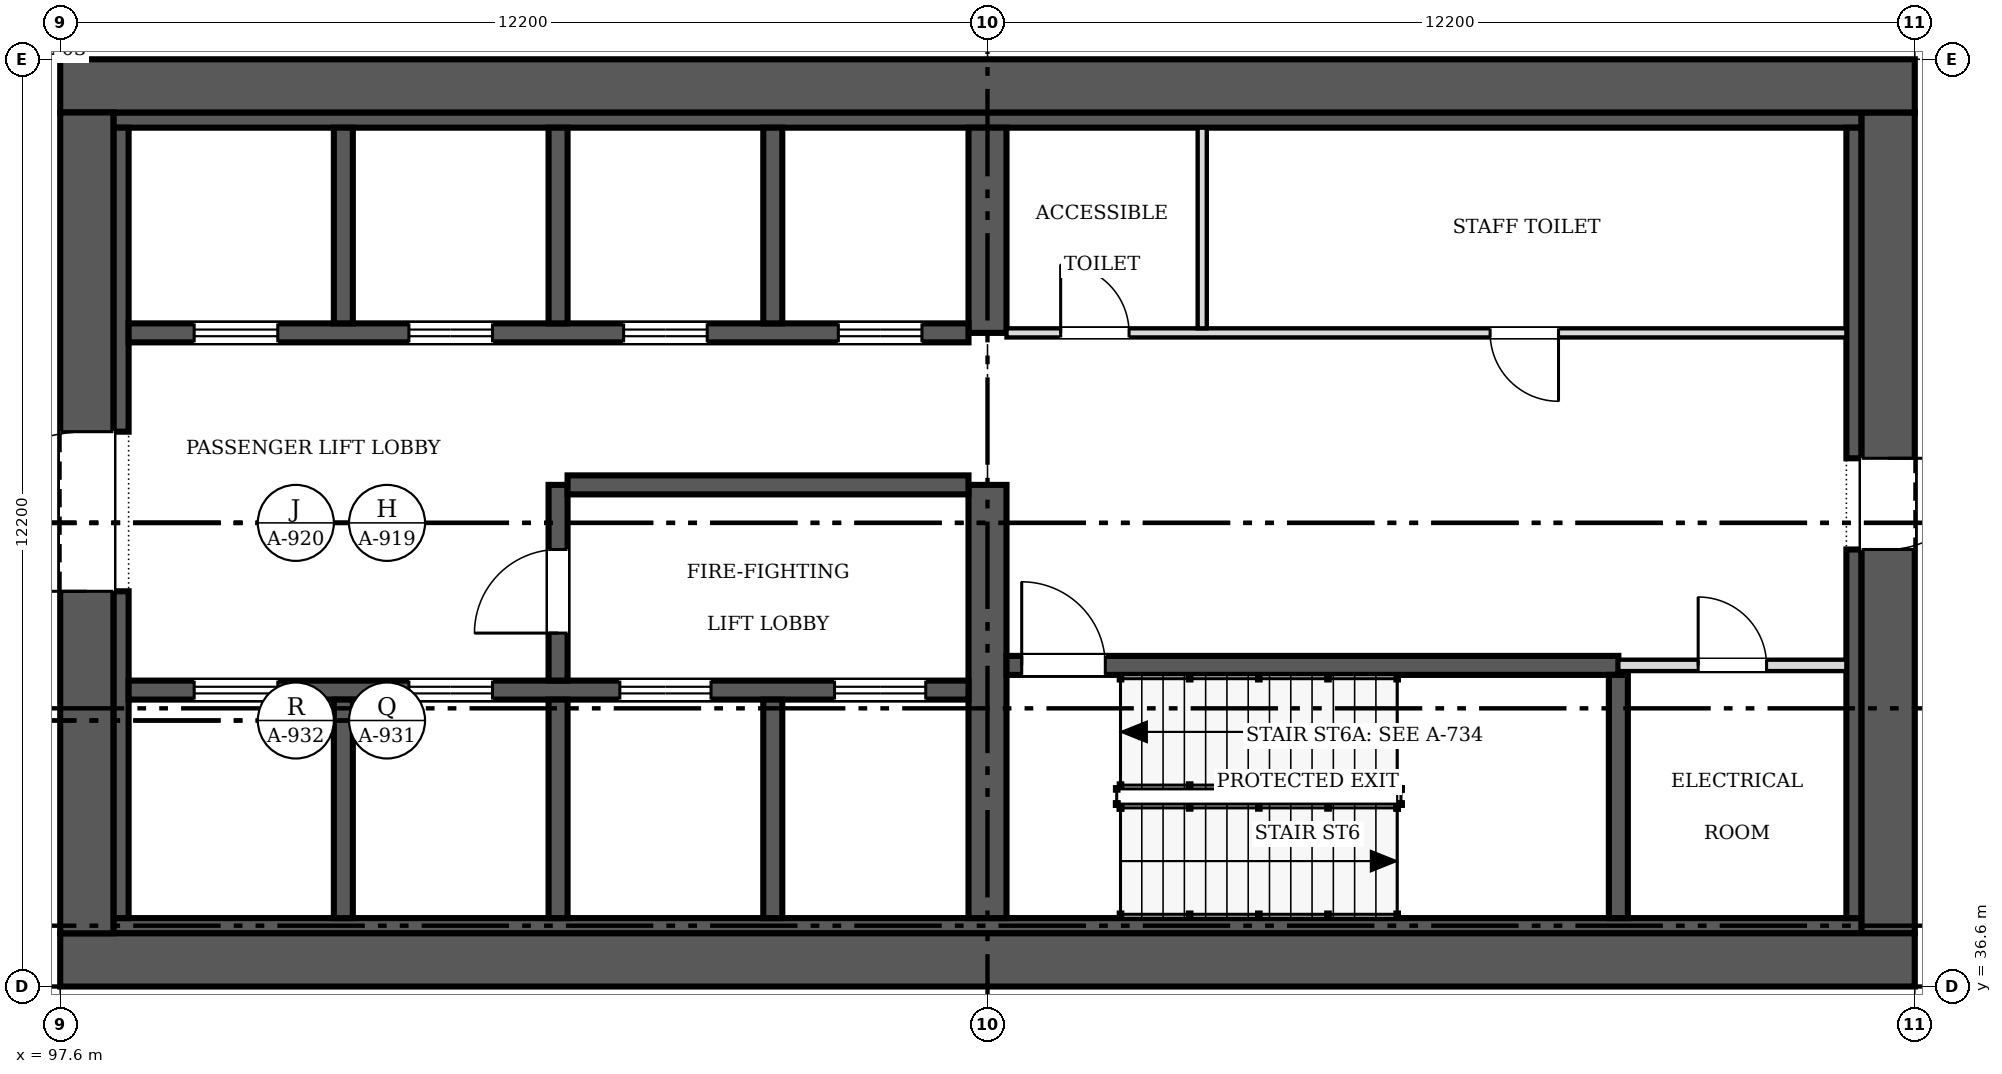
"""IFC4 building model, lengths in metres.
Left out: names, types, materials, properties, quantities, classifications, styles, units other than length and angle.
Written with IfcOpenShell. Run it as: python <this file> out.ifc"""

import sys

from ifc_helpers import new_model, si_unit, direction, frame, frame_2d, origin, place, context, subcontext, project, spatial, rectangle, extrude, source, transform, mapped, element, fill, save


model = new_model("IFC4")
c1 = context("Model", 3, precision=1e-05, world=origin(), true_north=direction((0.0, 1.0)))
c2 = subcontext(c1, "Body", "Model", "MODEL_VIEW")
j1 = project(units=[si_unit("LENGTHUNIT", "METRE"), si_unit("PLANEANGLEUNIT", "RADIAN")], contexts=[c1])
p1 = place(None, origin())
s1 = spatial("IfcSite", under=j1, at=p1, CompositionType="ELEMENT")
p2 = place(p1, origin())
s2 = spatial("IfcBuilding", under=s1, at=p2, CompositionType="ELEMENT")
p3 = place(p2, frame((0.0, 0.0, 7.2)))
s3 = spatial("IfcBuildingStorey", under=s2, at=p3, CompositionType="ELEMENT", Elevation=7.2)
p4 = place(p3, frame((122.0, 36.95, 0.0), z_axis=(0.0, 0.0, 1.0), x_axis=(-1.0, 0.0, 0.0)))
e1 = element("IfcWall", 1, at=p4, inside=s3, PredefinedType="SHEAR", context=c2, shape_type="SweptSolid", body=[
    extrude(rectangle(XDim=24.4, YDim=0.7, at=frame_2d((12.2, 0.0))), origin(), (0.0, 0.0, 1.0), 4.8),
])
p5 = place(p3, frame((97.95, 37.3, 0.0), z_axis=(0.0, 0.0, 1.0), x_axis=(0.0, 1.0, 0.0)))
e2 = element("IfcWall", 2, at=p5, inside=s3, PredefinedType="SHEAR", context=c2, shape_type="SweptSolid", body=[
    extrude(rectangle(XDim=10.8, YDim=0.7, at=frame_2d((5.4, 0.0))), origin(), (0.0, 0.0, 1.0), 4.8),
])
m1 = source(origin(), c2, "Body", "SweptSolid", [
    extrude(rectangle(XDim=2.1, YDim=2.4, at=frame_2d((1.05, 1.2))), frame((0.0, 0.36, 0.0), z_axis=(0.0, -1.0, 0.0), x_axis=(1.0, 0.0, 0.0)), (0.0, 0.0, 1.0), 0.72),
])
p6 = place(p5, frame((4.5, 0.0, 0.0)))
e3 = element("IfcOpeningElement", 3, at=p6, cuts=e2, PredefinedType="OPENING", context=c2, shape_type="MappedRepresentation", body=[
    mapped(m1, transform((0.0, 0.0, 0.0), scale=1.0)),
])
p7 = place(p3, frame((97.6, 48.45, 0.0), z_axis=(0.0, 0.0, 1.0), x_axis=(1.0, 0.0, 0.0)))
e4 = element("IfcWall", 4, at=p7, inside=s3, PredefinedType="SHEAR", context=c2, shape_type="SweptSolid", body=[
    extrude(rectangle(XDim=24.4, YDim=0.7, at=frame_2d((12.2, 0.0))), origin(), (0.0, 0.0, 1.0), 4.8),
])
p8 = place(p3, frame((121.65, 48.1, 0.0), z_axis=(0.0, 0.0, 1.0), x_axis=(0.0, -1.0, 0.0)))
e5 = element("IfcWall", 5, at=p8, inside=s3, PredefinedType="SHEAR", context=c2, shape_type="SweptSolid", body=[
    extrude(rectangle(XDim=10.8, YDim=0.7, at=frame_2d((5.4, 0.0))), origin(), (0.0, 0.0, 1.0), 4.8),
])
m2 = source(origin(), c2, "Body", "SweptSolid", [
    extrude(rectangle(XDim=1.2, YDim=2.1, at=frame_2d((0.6, 1.05))), frame((0.0, 0.36, 0.0), z_axis=(0.0, -1.0, 0.0), x_axis=(1.0, 0.0, 0.0)), (0.0, 0.0, 1.0), 0.72),
])
p9 = place(p8, frame((4.55, 0.0, 0.0)))
e6 = element("IfcOpeningElement", 6, at=p9, cuts=e5, PredefinedType="OPENING", context=c2, shape_type="MappedRepresentation", body=[
    mapped(m2, transform((0.0, 0.0, 0.0), scale=1.0)),
])
for number, where, z_axis, x_axis in (
    (7, (98.3, 37.4, 0.0), (0.0, 0.0, 1.0), (1.0, 0.0, 0.0)),
    (8, (98.3, 48.0, 0.0), (0.0, 0.0, 1.0), (1.0, 0.0, 0.0)),
):
    element("IfcWall", number, at=place(p3, frame(where, z_axis=z_axis, x_axis=x_axis)), inside=s3, PredefinedType="SOLIDWALL", context=c2, shape_type="SweptSolid", body=[
        extrude(rectangle(XDim=23.0, YDim=0.2, at=frame_2d((11.5, 0.0))), origin(), (0.0, 0.0, 1.0), 4.8),
    ])
p10 = place(p3, frame((98.4, 37.5, 0.0), z_axis=(0.0, 0.0, 1.0), x_axis=(0.0, 1.0, 0.0)))
e9 = element("IfcWall", 9, at=p10, inside=s3, PredefinedType="SOLIDWALL", context=c2, shape_type="SweptSolid", body=[
    extrude(rectangle(XDim=4.3, YDim=0.2, at=frame_2d((2.15, 0.0))), origin(), (0.0, 0.0, 1.0), 4.8),
])
p11 = place(p3, frame((98.4, 43.9, 0.0), z_axis=(0.0, 0.0, 1.0), x_axis=(0.0, 1.0, 0.0)))
e10 = element("IfcWall", 10, at=p11, inside=s3, PredefinedType="SOLIDWALL", context=c2, shape_type="SweptSolid", body=[
    extrude(rectangle(XDim=4.0, YDim=0.2, at=frame_2d((2.0, 0.0))), origin(), (0.0, 0.0, 1.0), 4.8),
])
p12 = place(p3, frame((121.2, 37.5, 0.0), z_axis=(0.0, 0.0, 1.0), x_axis=(0.0, 1.0, 0.0)))
e11 = element("IfcWall", 11, at=p12, inside=s3, PredefinedType="SOLIDWALL", context=c2, shape_type="SweptSolid", body=[
    extrude(rectangle(XDim=4.85, YDim=0.2, at=frame_2d((2.425, 0.0))), origin(), (0.0, 0.0, 1.0), 4.8),
])
p13 = place(p3, frame((121.2, 43.55, 0.0), z_axis=(0.0, 0.0, 1.0), x_axis=(0.0, 1.0, 0.0)))
e12 = element("IfcWall", 12, at=p13, inside=s3, PredefinedType="SOLIDWALL", context=c2, shape_type="SweptSolid", body=[
    extrude(rectangle(XDim=4.35, YDim=0.2, at=frame_2d((2.175, 0.0))), origin(), (0.0, 0.0, 1.0), 4.8),
])
p14 = place(p3, frame((109.8, 37.5, 0.0), z_axis=(0.0, 0.0, 1.0), x_axis=(0.0, 1.0, 0.0)))
e13 = element("IfcWall", 13, at=p14, inside=s3, PredefinedType="SHEAR", context=c2, shape_type="SweptSolid", body=[
    extrude(rectangle(XDim=5.7, YDim=0.5, at=frame_2d((2.85, 0.0))), origin(), (0.0, 0.0, 1.0), 4.8),
])
p15 = place(p3, frame((109.8, 45.2, 0.0), z_axis=(0.0, 0.0, 1.0), x_axis=(0.0, 1.0, 0.0)))
e14 = element("IfcWall", 14, at=p15, inside=s3, PredefinedType="SHEAR", context=c2, shape_type="SweptSolid", body=[
    extrude(rectangle(XDim=2.7, YDim=0.5, at=frame_2d((1.35, 0.0))), origin(), (0.0, 0.0, 1.0), 4.8),
])
p16 = place(p3, frame((98.5, 40.5, 0.0), z_axis=(0.0, 0.0, 1.0), x_axis=(1.0, 0.0, 0.0)))
e15 = element("IfcWall", 15, at=p16, inside=s3, PredefinedType="SOLIDWALL", context=c2, shape_type="SweptSolid", body=[
    extrude(rectangle(XDim=11.05, YDim=0.25, at=frame_2d((5.525, 0.0))), origin(), (0.0, 0.0, 1.0), 4.8),
])
m3 = source(origin(), c2, "Body", "SweptSolid", [
    extrude(rectangle(XDim=1.1, YDim=2.1, at=frame_2d((0.55, 1.05))), frame((0.0, 0.135, 0.0), z_axis=(0.0, -1.0, 0.0), x_axis=(1.0, 0.0, 0.0)), (0.0, 0.0, 1.0), 0.27),
])
p17 = place(p16, frame((0.863, 0.0, 0.0)))
e16 = element("IfcOpeningElement", 16, at=p17, cuts=e15, PredefinedType="OPENING", context=c2, shape_type="MappedRepresentation", body=[
    mapped(m3, transform((0.0, 0.0, 0.0), scale=1.0)),
])
p18 = place(p16, frame((3.688, 0.0, 0.0)))
e17 = element("IfcOpeningElement", 17, at=p18, cuts=e15, PredefinedType="OPENING", context=c2, shape_type="MappedRepresentation", body=[
    mapped(m3, transform((0.0, 0.0, 0.0), scale=1.0)),
])
m4 = source(origin(), c2, "Body", "SweptSolid", [
    extrude(rectangle(XDim=1.2, YDim=2.1, at=frame_2d((0.6, 1.05))), frame((0.0, 0.135, 0.0), z_axis=(0.0, -1.0, 0.0), x_axis=(1.0, 0.0, 0.0)), (0.0, 0.0, 1.0), 0.27),
])
p19 = place(p16, frame((6.462, 0.0, 0.0)))
e18 = element("IfcOpeningElement", 18, at=p19, cuts=e15, PredefinedType="OPENING", context=c2, shape_type="MappedRepresentation", body=[
    mapped(m4, transform((0.0, 0.0, 0.0), scale=1.0)),
])
p20 = place(p16, frame((9.288, 0.0, 0.0)))
e19 = element("IfcOpeningElement", 19, at=p20, cuts=e15, PredefinedType="OPENING", context=c2, shape_type="MappedRepresentation", body=[
    mapped(m4, transform((0.0, 0.0, 0.0), scale=1.0)),
])
p21 = place(p3, frame((109.55, 45.2, 0.0), z_axis=(0.0, 0.0, 1.0), x_axis=(-1.0, 0.0, 0.0)))
e20 = element("IfcWall", 20, at=p21, inside=s3, PredefinedType="SOLIDWALL", context=c2, shape_type="SweptSolid", body=[
    extrude(rectangle(XDim=11.05, YDim=0.25, at=frame_2d((5.525, 0.0))), origin(), (0.0, 0.0, 1.0), 4.8),
])
p22 = place(p21, frame((9.087, 0.0, 0.0)))
e21 = element("IfcOpeningElement", 21, at=p22, cuts=e20, PredefinedType="OPENING", context=c2, shape_type="MappedRepresentation", body=[
    mapped(m3, transform((0.0, 0.0, 0.0), scale=1.0)),
])
p23 = place(p21, frame((6.262, 0.0, 0.0)))
e22 = element("IfcOpeningElement", 22, at=p23, cuts=e20, PredefinedType="OPENING", context=c2, shape_type="MappedRepresentation", body=[
    mapped(m3, transform((0.0, 0.0, 0.0), scale=1.0)),
])
p24 = place(p21, frame((3.438, 0.0, 0.0)))
e23 = element("IfcOpeningElement", 23, at=p24, cuts=e20, PredefinedType="OPENING", context=c2, shape_type="MappedRepresentation", body=[
    mapped(m3, transform((0.0, 0.0, 0.0), scale=1.0)),
])
p25 = place(p21, frame((0.613, 0.0, 0.0)))
e24 = element("IfcOpeningElement", 24, at=p25, cuts=e20, PredefinedType="OPENING", context=c2, shape_type="MappedRepresentation", body=[
    mapped(m3, transform((0.0, 0.0, 0.0), scale=1.0)),
])
p26 = place(p3, frame((118.1, 40.825, 0.0), z_axis=(0.0, 0.0, 1.0), x_axis=(-1.0, 0.0, 0.0)))
e25 = element("IfcWall", 25, at=p26, inside=s3, PredefinedType="SOLIDWALL", context=c2, shape_type="SweptSolid", body=[
    extrude(rectangle(XDim=8.05, YDim=0.25, at=frame_2d((4.025, 0.0))), origin(), (0.0, 0.0, 1.0), 4.8),
])
p27 = place(p26, frame((6.75, 0.0, 0.0)))
e26 = element("IfcOpeningElement", 26, at=p27, cuts=e25, PredefinedType="OPENING", context=c2, shape_type="MappedRepresentation", body=[
    mapped(m3, transform((0.0, 0.0, 0.0), scale=1.0)),
])
p28 = place(p3, frame((104.15, 37.5, 0.0), z_axis=(0.0, 0.0, 1.0), x_axis=(0.0, 1.0, 0.0)))
e27 = element("IfcWall", 27, at=p28, inside=s3, PredefinedType="SOLIDWALL", context=c2, shape_type="SweptSolid", body=[
    extrude(rectangle(XDim=2.875, YDim=0.25, at=frame_2d((1.438, 0.0))), origin(), (0.0, 0.0, 1.0), 4.8),
])
p29 = place(p3, frame((104.15, 43.2, 0.0), z_axis=(0.0, 0.0, 1.0), x_axis=(0.0, -1.0, 0.0)))
e28 = element("IfcWall", 28, at=p29, inside=s3, PredefinedType="SOLIDWALL", context=c2, shape_type="SweptSolid", body=[
    extrude(rectangle(XDim=2.575, YDim=0.25, at=frame_2d((1.288, 0.0))), origin(), (0.0, 0.0, 1.0), 4.8),
])
p30 = place(p29, frame((0.85, 0.0, 0.0)))
e29 = element("IfcOpeningElement", 29, at=p30, cuts=e28, PredefinedType="OPENING", context=c2, shape_type="MappedRepresentation", body=[
    mapped(m3, transform((0.0, 0.0, 0.0), scale=1.0)),
])
p31 = place(p3, frame((104.275, 43.2, 0.0), z_axis=(0.0, 0.0, 1.0), x_axis=(1.0, 0.0, 0.0)))
e30 = element("IfcWall", 30, at=p31, inside=s3, PredefinedType="SOLIDWALL", context=c2, shape_type="SweptSolid", body=[
    extrude(rectangle(XDim=5.275, YDim=0.25, at=frame_2d((2.638, 0.0))), origin(), (0.0, 0.0, 1.0), 4.8),
])
p32 = place(p3, frame((118.1, 37.5, 0.0), z_axis=(0.0, 0.0, 1.0), x_axis=(0.0, 1.0, 0.0)))
e31 = element("IfcWall", 31, at=p32, inside=s3, PredefinedType="SOLIDWALL", context=c2, shape_type="SweptSolid", body=[
    extrude(rectangle(XDim=3.2, YDim=0.25, at=frame_2d((1.6, 0.0))), origin(), (0.0, 0.0, 1.0), 4.8),
])
for number, where, z_axis, x_axis in (
    (32, (101.325, 37.5, 0.0), (0.0, 0.0, 1.0), (0.0, 1.0, 0.0)),
    (33, (106.975, 37.5, 0.0), (0.0, 0.0, 1.0), (0.0, 1.0, 0.0)),
):
    element("IfcWall", number, at=place(p3, frame(where, z_axis=z_axis, x_axis=x_axis)), inside=s3, PredefinedType="SOLIDWALL", context=c2, shape_type="SweptSolid", body=[
        extrude(rectangle(XDim=2.875, YDim=0.25, at=frame_2d((1.438, 0.0))), origin(), (0.0, 0.0, 1.0), 4.8),
    ])
for number, where, z_axis, x_axis in (
    (34, (101.325, 45.325, 0.0), (0.0, 0.0, 1.0), (0.0, 1.0, 0.0)),
    (35, (104.15, 45.325, 0.0), (0.0, 0.0, 1.0), (0.0, 1.0, 0.0)),
    (36, (106.975, 45.325, 0.0), (0.0, 0.0, 1.0), (0.0, 1.0, 0.0)),
):
    element("IfcWall", number, at=place(p3, frame(where, z_axis=z_axis, x_axis=x_axis)), inside=s3, PredefinedType="SOLIDWALL", context=c2, shape_type="SweptSolid", body=[
        extrude(rectangle(XDim=2.575, YDim=0.25, at=frame_2d((1.288, 0.0))), origin(), (0.0, 0.0, 1.0), 4.8),
    ])
p33 = place(p3, frame((110.05, 45.2, 0.0), z_axis=(0.0, 0.0, 1.0), x_axis=(1.0, 0.0, 0.0)))
e37 = element("IfcWall", 37, at=p33, inside=s3, PredefinedType="PARTITIONING", context=c2, shape_type="SweptSolid", body=[
    extrude(rectangle(XDim=11.05, YDim=0.12, at=frame_2d((5.525, 0.0))), origin(), (0.0, 0.0, 1.0), 4.55),
])
m5 = source(origin(), c2, "Body", "SweptSolid", [
    extrude(rectangle(XDim=0.9, YDim=2.1, at=frame_2d((0.45, 1.05))), frame((0.0, 0.07, 0.0), z_axis=(0.0, -1.0, 0.0), x_axis=(1.0, 0.0, 0.0)), (0.0, 0.0, 1.0), 0.14),
])
p34 = place(p33, frame((0.712, 0.0, 0.0)))
e38 = element("IfcOpeningElement", 38, at=p34, cuts=e37, PredefinedType="OPENING", context=c2, shape_type="MappedRepresentation", body=[
    mapped(m5, transform((0.0, 0.0, 0.0), scale=1.0)),
])
p35 = place(p33, frame((6.363, 0.0, 0.0)))
e39 = element("IfcOpeningElement", 39, at=p35, cuts=e37, PredefinedType="OPENING", context=c2, shape_type="MappedRepresentation", body=[
    mapped(m5, transform((0.0, 0.0, 0.0), scale=1.0)),
])
p36 = place(p3, frame((121.1, 40.825, 0.0), z_axis=(0.0, 0.0, 1.0), x_axis=(-1.0, 0.0, 0.0)))
e40 = element("IfcWall", 40, at=p36, inside=s3, PredefinedType="PARTITIONING", context=c2, shape_type="SweptSolid", body=[
    extrude(rectangle(XDim=3.0, YDim=0.15, at=frame_2d((1.5, 0.0))), origin(), (0.0, 0.0, 1.0), 4.55),
])
m6 = source(origin(), c2, "Body", "SweptSolid", [
    extrude(rectangle(XDim=0.9, YDim=2.1, at=frame_2d((0.45, 1.05))), frame((0.0, 0.085, 0.0), z_axis=(0.0, -1.0, 0.0), x_axis=(1.0, 0.0, 0.0)), (0.0, 0.0, 1.0), 0.17),
])
p37 = place(p36, frame((1.05, 0.0, 0.0)))
e41 = element("IfcOpeningElement", 41, at=p37, cuts=e40, PredefinedType="OPENING", context=c2, shape_type="MappedRepresentation", body=[
    mapped(m6, transform((0.0, 0.0, 0.0), scale=1.0)),
])
p38 = place(p3, frame((112.625, 45.26, 0.0), z_axis=(0.0, 0.0, 1.0), x_axis=(0.0, 1.0, 0.0)))
e42 = element("IfcWall", 42, at=p38, inside=s3, PredefinedType="PARTITIONING", context=c2, shape_type="SweptSolid", body=[
    extrude(rectangle(XDim=2.64, YDim=0.12, at=frame_2d((1.32, 0.0))), origin(), (0.0, 0.0, 1.0), 4.55),
])
m7 = source(origin(), c2, "Body", "SweptSolid", [
    extrude(rectangle(XDim=2.1, YDim=2.4, at=frame_2d((1.05, 1.2))), frame((0.0, 0.025, 0.0), z_axis=(0.0, -1.0, 0.0), x_axis=(1.0, 0.0, 0.0)), (0.0, 0.0, 1.0), 0.05),
])
p39 = place(p6, origin())
e43 = element("IfcDoor", 43, at=p39, inside=s3, OperationType="DOUBLE_DOOR_SINGLE_SWING", PredefinedType="DOOR", context=c2, shape_type="MappedRepresentation", body=[
    mapped(m7, transform((0.0, 0.0, 0.0), scale=1.0)),
])
fill(e3, e43)
m8 = source(origin(), c2, "Body", "SweptSolid", [
    extrude(rectangle(XDim=1.2, YDim=2.1, at=frame_2d((0.6, 1.05))), frame((0.0, 0.025, 0.0), z_axis=(0.0, -1.0, 0.0), x_axis=(1.0, 0.0, 0.0)), (0.0, 0.0, 1.0), 0.05),
])
p40 = place(p9, origin())
e44 = element("IfcDoor", 44, at=p40, inside=s3, OperationType="SINGLE_SWING_LEFT", PredefinedType="DOOR", context=c2, shape_type="MappedRepresentation", body=[
    mapped(m8, transform((0.0, 0.0, 0.0), scale=1.0)),
])
fill(e6, e44)
m9 = source(origin(), c2, "Body", "SweptSolid", [
    extrude(rectangle(XDim=1.1, YDim=2.1, at=frame_2d((0.55, 1.05))), frame((0.0, 0.025, 0.0), z_axis=(0.0, -1.0, 0.0), x_axis=(1.0, 0.0, 0.0)), (0.0, 0.0, 1.0), 0.05),
])
p41 = place(p17, origin())
e45 = element("IfcDoor", 45, at=p41, inside=s3, OperationType="DOUBLE_DOOR_SLIDING", PredefinedType="DOOR", context=c2, shape_type="MappedRepresentation", body=[
    mapped(m9, transform((0.0, 0.0, 0.0), scale=1.0)),
])
fill(e16, e45)
p42 = place(p18, origin())
e46 = element("IfcDoor", 46, at=p42, inside=s3, OperationType="DOUBLE_DOOR_SLIDING", PredefinedType="DOOR", context=c2, shape_type="MappedRepresentation", body=[
    mapped(m9, transform((0.0, 0.0, 0.0), scale=1.0)),
])
fill(e17, e46)
p43 = place(p19, origin())
e47 = element("IfcDoor", 47, at=p43, inside=s3, OperationType="DOUBLE_DOOR_SLIDING", PredefinedType="DOOR", context=c2, shape_type="MappedRepresentation", body=[
    mapped(m8, transform((0.0, 0.0, 0.0), scale=1.0)),
])
fill(e18, e47)
p44 = place(p20, origin())
e48 = element("IfcDoor", 48, at=p44, inside=s3, OperationType="DOUBLE_DOOR_SLIDING", PredefinedType="DOOR", context=c2, shape_type="MappedRepresentation", body=[
    mapped(m8, transform((0.0, 0.0, 0.0), scale=1.0)),
])
fill(e19, e48)
p45 = place(p22, origin())
e49 = element("IfcDoor", 49, at=p45, inside=s3, OperationType="DOUBLE_DOOR_SLIDING", PredefinedType="DOOR", context=c2, shape_type="MappedRepresentation", body=[
    mapped(m9, transform((0.0, 0.0, 0.0), scale=1.0)),
])
fill(e21, e49)
p46 = place(p23, origin())
e50 = element("IfcDoor", 50, at=p46, inside=s3, OperationType="DOUBLE_DOOR_SLIDING", PredefinedType="DOOR", context=c2, shape_type="MappedRepresentation", body=[
    mapped(m9, transform((0.0, 0.0, 0.0), scale=1.0)),
])
fill(e22, e50)
p47 = place(p24, origin())
e51 = element("IfcDoor", 51, at=p47, inside=s3, OperationType="DOUBLE_DOOR_SLIDING", PredefinedType="DOOR", context=c2, shape_type="MappedRepresentation", body=[
    mapped(m9, transform((0.0, 0.0, 0.0), scale=1.0)),
])
fill(e23, e51)
p48 = place(p25, origin())
e52 = element("IfcDoor", 52, at=p48, inside=s3, OperationType="DOUBLE_DOOR_SLIDING", PredefinedType="DOOR", context=c2, shape_type="MappedRepresentation", body=[
    mapped(m9, transform((0.0, 0.0, 0.0), scale=1.0)),
])
fill(e24, e52)
p49 = place(p27, origin())
e53 = element("IfcDoor", 53, at=p49, inside=s3, OperationType="SINGLE_SWING_RIGHT", PredefinedType="DOOR", context=c2, shape_type="MappedRepresentation", body=[
    mapped(m9, transform((0.0, 0.0, 0.0), scale=1.0)),
])
fill(e26, e53)
p50 = place(p30, origin())
e54 = element("IfcDoor", 54, at=p50, inside=s3, OperationType="SINGLE_SWING_RIGHT", PredefinedType="DOOR", context=c2, shape_type="MappedRepresentation", body=[
    mapped(m9, transform((0.0, 0.0, 0.0), scale=1.0)),
])
fill(e29, e54)
m10 = source(origin(), c2, "Body", "SweptSolid", [
    extrude(rectangle(XDim=0.9, YDim=2.1, at=frame_2d((0.45, 1.05))), frame((0.0, 0.025, 0.0), z_axis=(0.0, -1.0, 0.0), x_axis=(1.0, 0.0, 0.0)), (0.0, 0.0, 1.0), 0.05),
])
p51 = place(p34, origin())
e55 = element("IfcDoor", 55, at=p51, inside=s3, OperationType="SINGLE_SWING_LEFT", PredefinedType="DOOR", context=c2, shape_type="MappedRepresentation", body=[
    mapped(m10, transform((0.0, 0.0, 0.0), scale=1.0)),
])
fill(e38, e55)
p52 = place(p35, origin())
e56 = element("IfcDoor", 56, at=p52, inside=s3, OperationType="SINGLE_SWING_RIGHT", PredefinedType="DOOR", context=c2, shape_type="MappedRepresentation", body=[
    mapped(m10, transform((0.0, 0.0, 0.0), scale=1.0)),
])
fill(e39, e56)
p53 = place(p37, origin())
e57 = element("IfcDoor", 57, at=p53, inside=s3, OperationType="SINGLE_SWING_RIGHT", PredefinedType="DOOR", context=c2, shape_type="MappedRepresentation", body=[
    mapped(m10, transform((0.0, 0.0, 0.0), scale=1.0)),
])
fill(e41, e57)
save(model, sys.argv[1])
